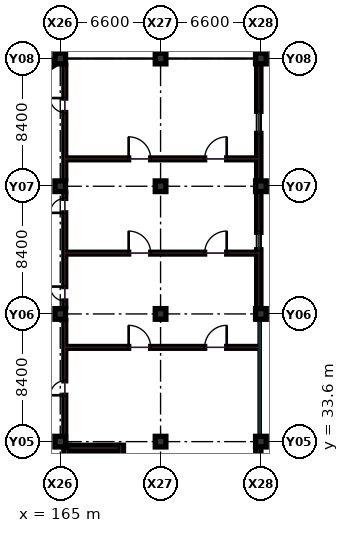
"""IFC4 building model, lengths in metres.
Left out: names, types, materials, properties, quantities, classifications, styles, units other than length and angle.
Written with IfcOpenShell. Run it as: python <this file> out.ifc"""

import sys

from ifc_helpers import new_model, si_unit, direction, frame, frame_2d, origin, origin_2d, place, context, subcontext, project, spatial, rectangle, extrude, element, fill, save


model = new_model("IFC4")
c1 = context("Model", 3, precision=1e-05, world=origin(), true_north=direction((0.0, 1.0)))
c2 = subcontext(c1, "Body", "Model", "MODEL_VIEW")
j1 = project(units=[si_unit("LENGTHUNIT", "METRE"), si_unit("PLANEANGLEUNIT", "RADIAN")], contexts=[c1])
p1 = place(None, origin())
s1 = spatial("IfcSite", under=j1, at=p1, CompositionType="ELEMENT")
p2 = place(p1, origin())
s2 = spatial("IfcBuilding", under=s1, at=p2, CompositionType="ELEMENT")
p3 = place(p2, frame((0.0, 0.0, 14.4)))
s3 = spatial("IfcBuildingStorey", under=s2, at=p3, CompositionType="ELEMENT", Elevation=14.4)
for number, where, z_axis, x_axis in (
    (1, (165.0, 33.6, 0.0), (0.0, 0.0, 1.0), (1.0, 0.0, 0.0)),
    (2, (165.0, 42.0, 0.0), (0.0, 0.0, 1.0), (1.0, 0.0, 0.0)),
    (3, (165.0, 50.4, 0.0), (0.0, 0.0, 1.0), (1.0, 0.0, 0.0)),
    (4, (165.0, 58.8, 0.0), (0.0, 0.0, 1.0), (1.0, 0.0, 0.0)),
    (5, (171.6, 33.6, 0.0), (0.0, 0.0, 1.0), (1.0, 0.0, 0.0)),
    (6, (171.6, 42.0, 0.0), (0.0, 0.0, 1.0), (1.0, 0.0, 0.0)),
    (7, (171.6, 50.4, 0.0), (0.0, 0.0, 1.0), (1.0, 0.0, 0.0)),
    (8, (171.6, 58.8, 0.0), (0.0, 0.0, 1.0), (1.0, 0.0, 0.0)),
    (9, (178.2, 33.6, 0.0), (0.0, 0.0, 1.0), (1.0, 0.0, 0.0)),
    (10, (178.2, 42.0, 0.0), (0.0, 0.0, 1.0), (1.0, 0.0, 0.0)),
    (11, (178.2, 50.4, 0.0), (0.0, 0.0, 1.0), (1.0, 0.0, 0.0)),
    (12, (178.2, 58.8, 0.0), (0.0, 0.0, 1.0), (1.0, 0.0, 0.0)),
):
    element("IfcColumn", number, at=place(p3, frame(where, z_axis=z_axis, x_axis=x_axis)), inside=s3, PredefinedType="COLUMN", context=c2, shape_type="SweptSolid", body=[
        extrude(rectangle(XDim=0.7, YDim=0.7, at=origin_2d()), origin(), (0.0, 0.0, 1.0), 4.2),
    ])
p4 = place(p3, frame((165.3, 33.65, 0.0), z_axis=(0.0, 0.0, 1.0), x_axis=(0.0, 1.0, 0.0)))
e13 = element("IfcWall", 13, at=p4, inside=s3, PredefinedType="PARTITIONING", context=c2, shape_type="SweptSolid", body=[
    extrude(rectangle(XDim=7.9, YDim=0.12, at=frame_2d((3.95, 0.0))), origin(), (0.0, 0.0, 1.0), 3.19),
])
p5 = place(p4, frame((3.0, 0.0, 0.0)))
e14 = element("IfcOpeningElement", 14, at=p5, cuts=e13, PredefinedType="OPENING", context=c2, shape_type="SweptSolid", body=[
    extrude(rectangle(XDim=0.95, YDim=2.15, at=frame_2d((0.475, 1.075))), frame((0.0, 0.07, 0.0), z_axis=(0.0, -1.0, 0.0), x_axis=(1.0, 0.0, 0.0)), (0.0, 0.0, 1.0), 0.14),
])
p6 = place(p3, frame((165.3, 42.45, 0.0), z_axis=(0.0, 0.0, 1.0), x_axis=(0.0, 1.0, 0.0)))
e15 = element("IfcWall", 15, at=p6, inside=s3, PredefinedType="PARTITIONING", context=c2, shape_type="SweptSolid", body=[
    extrude(rectangle(XDim=7.5, YDim=0.12, at=frame_2d((3.75, 0.0))), origin(), (0.0, 0.0, 1.0), 3.19),
])
p7 = place(p6, frame((0.4, 0.0, 0.0)))
e16 = element("IfcOpeningElement", 16, at=p7, cuts=e15, PredefinedType="OPENING", context=c2, shape_type="SweptSolid", body=[
    extrude(rectangle(XDim=0.95, YDim=2.15, at=frame_2d((0.475, 1.075))), frame((0.0, 0.07, 0.0), z_axis=(0.0, -1.0, 0.0), x_axis=(1.0, 0.0, 0.0)), (0.0, 0.0, 1.0), 0.14),
])
p8 = place(p6, frame((6.2, 0.0, 0.0)))
e17 = element("IfcOpeningElement", 17, at=p8, cuts=e15, PredefinedType="OPENING", context=c2, shape_type="SweptSolid", body=[
    extrude(rectangle(XDim=0.95, YDim=2.15, at=frame_2d((0.475, 1.075))), frame((0.0, 0.07, 0.0), z_axis=(0.0, -1.0, 0.0), x_axis=(1.0, 0.0, 0.0)), (0.0, 0.0, 1.0), 0.14),
])
p9 = place(p3, frame((165.3, 50.85, 0.0), z_axis=(0.0, 0.0, 1.0), x_axis=(0.0, 1.0, 0.0)))
e18 = element("IfcWall", 18, at=p9, inside=s3, PredefinedType="PARTITIONING", context=c2, shape_type="SweptSolid", body=[
    extrude(rectangle(XDim=7.53, YDim=0.12, at=frame_2d((3.765, 0.0))), origin(), (0.0, 0.0, 1.0), 3.19),
])
p10 = place(p9, frame((4.4, 0.0, 0.0)))
e19 = element("IfcOpeningElement", 19, at=p10, cuts=e18, PredefinedType="OPENING", context=c2, shape_type="SweptSolid", body=[
    extrude(rectangle(XDim=0.95, YDim=2.15, at=frame_2d((0.475, 1.075))), frame((0.0, 0.07, 0.0), z_axis=(0.0, -1.0, 0.0), x_axis=(1.0, 0.0, 0.0)), (0.0, 0.0, 1.0), 0.14),
])
p11 = place(p3, frame((165.3, 39.8, 0.0), z_axis=(0.0, 0.0, 1.0), x_axis=(1.0, 0.0, 0.0)))
e20 = element("IfcWall", 20, at=p11, inside=s3, PredefinedType="PARTITIONING", context=c2, shape_type="SweptSolid", body=[
    extrude(rectangle(XDim=12.75, YDim=0.12, at=frame_2d((6.375, 0.0))), origin(), (0.0, 0.0, 1.0), 3.19),
])
p12 = place(p11, frame((4.2, 0.0, 0.0)))
e21 = element("IfcOpeningElement", 21, at=p12, cuts=e20, PredefinedType="OPENING", context=c2, shape_type="SweptSolid", body=[
    extrude(rectangle(XDim=1.45, YDim=2.25, at=frame_2d((0.725, 1.125))), frame((0.0, 0.07, 0.0), z_axis=(0.0, -1.0, 0.0), x_axis=(1.0, 0.0, 0.0)), (0.0, 0.0, 1.0), 0.14),
])
p13 = place(p11, frame((9.2, 0.0, 0.0)))
e22 = element("IfcOpeningElement", 22, at=p13, cuts=e20, PredefinedType="OPENING", context=c2, shape_type="SweptSolid", body=[
    extrude(rectangle(XDim=1.45, YDim=2.25, at=frame_2d((0.725, 1.125))), frame((0.0, 0.07, 0.0), z_axis=(0.0, -1.0, 0.0), x_axis=(1.0, 0.0, 0.0)), (0.0, 0.0, 1.0), 0.14),
])
p14 = place(p3, frame((165.3, 46.0, 0.0), z_axis=(0.0, 0.0, 1.0), x_axis=(1.0, 0.0, 0.0)))
e23 = element("IfcWall", 23, at=p14, inside=s3, PredefinedType="PARTITIONING", context=c2, shape_type="SweptSolid", body=[
    extrude(rectangle(XDim=12.75, YDim=0.12, at=frame_2d((6.375, 0.0))), origin(), (0.0, 0.0, 1.0), 3.19),
])
p15 = place(p14, frame((4.2, 0.0, 0.0)))
e24 = element("IfcOpeningElement", 24, at=p15, cuts=e23, PredefinedType="OPENING", context=c2, shape_type="SweptSolid", body=[
    extrude(rectangle(XDim=1.45, YDim=2.25, at=frame_2d((0.725, 1.125))), frame((0.0, 0.07, 0.0), z_axis=(0.0, -1.0, 0.0), x_axis=(1.0, 0.0, 0.0)), (0.0, 0.0, 1.0), 0.14),
])
p16 = place(p14, frame((9.2, 0.0, 0.0)))
e25 = element("IfcOpeningElement", 25, at=p16, cuts=e23, PredefinedType="OPENING", context=c2, shape_type="SweptSolid", body=[
    extrude(rectangle(XDim=1.45, YDim=2.25, at=frame_2d((0.725, 1.125))), frame((0.0, 0.07, 0.0), z_axis=(0.0, -1.0, 0.0), x_axis=(1.0, 0.0, 0.0)), (0.0, 0.0, 1.0), 0.14),
])
p17 = place(p3, frame((165.3, 52.2, 0.0), z_axis=(0.0, 0.0, 1.0), x_axis=(1.0, 0.0, 0.0)))
e26 = element("IfcWall", 26, at=p17, inside=s3, PredefinedType="PARTITIONING", context=c2, shape_type="SweptSolid", body=[
    extrude(rectangle(XDim=12.75, YDim=0.12, at=frame_2d((6.375, 0.0))), origin(), (0.0, 0.0, 1.0), 3.19),
])
p18 = place(p17, frame((4.2, 0.0, 0.0)))
e27 = element("IfcOpeningElement", 27, at=p18, cuts=e26, PredefinedType="OPENING", context=c2, shape_type="SweptSolid", body=[
    extrude(rectangle(XDim=1.45, YDim=2.25, at=frame_2d((0.725, 1.125))), frame((0.0, 0.07, 0.0), z_axis=(0.0, -1.0, 0.0), x_axis=(1.0, 0.0, 0.0)), (0.0, 0.0, 1.0), 0.14),
])
p19 = place(p17, frame((9.2, 0.0, 0.0)))
e28 = element("IfcOpeningElement", 28, at=p19, cuts=e26, PredefinedType="OPENING", context=c2, shape_type="SweptSolid", body=[
    extrude(rectangle(XDim=1.45, YDim=2.25, at=frame_2d((0.725, 1.125))), frame((0.0, 0.07, 0.0), z_axis=(0.0, -1.0, 0.0), x_axis=(1.0, 0.0, 0.0)), (0.0, 0.0, 1.0), 0.14),
])
p20 = place(p3, frame((178.03, 25.545, 0.0), z_axis=(0.0, 0.0, 1.0), x_axis=(0.0, 1.0, 0.0)))
e29 = element("IfcWall", 29, at=p20, inside=s3, PredefinedType="SHEAR", context=c2, shape_type="SweptSolid", body=[
    extrude(rectangle(XDim=7.71, YDim=0.34, at=frame_2d((3.855, 0.0))), origin(), (0.0, 0.0, 1.0), 3.94),
])
p21 = place(p3, frame((178.06, 42.345, 0.0), z_axis=(0.0, 0.0, 1.0), x_axis=(0.0, 1.0, 0.0)))
e30 = element("IfcWall", 30, at=p21, inside=s3, PredefinedType="SOLIDWALL", context=c2, shape_type="SweptSolid", body=[
    extrude(rectangle(XDim=7.71, YDim=0.28, at=frame_2d((3.855, 0.0))), origin(), (0.0, 0.0, 1.0), 3.375),
])
p22 = place(p21, frame((3.875, 0.0, 0.95)))
e31 = element("IfcOpeningElement", 31, at=p22, cuts=e30, PredefinedType="OPENING", context=c2, shape_type="SweptSolid", body=[
    extrude(rectangle(XDim=1.15, YDim=1.6, at=frame_2d((0.575, 0.8))), frame((0.0, 0.15, 0.0), z_axis=(0.0, -1.0, 0.0), x_axis=(1.0, 0.0, 0.0)), (0.0, 0.0, 1.0), 0.3),
])
p23 = place(p3, frame((178.06, 50.745, 0.0), z_axis=(0.0, 0.0, 1.0), x_axis=(0.0, 1.0, 0.0)))
e32 = element("IfcWall", 32, at=p23, inside=s3, PredefinedType="SOLIDWALL", context=c2, shape_type="SweptSolid", body=[
    extrude(rectangle(XDim=7.71, YDim=0.28, at=frame_2d((3.855, 0.0))), origin(), (0.0, 0.0, 1.0), 3.225),
])
p24 = place(p23, frame((3.13, 0.0, 0.95)))
e33 = element("IfcOpeningElement", 33, at=p24, cuts=e32, PredefinedType="OPENING", context=c2, shape_type="SweptSolid", body=[
    extrude(rectangle(XDim=1.45, YDim=1.6, at=frame_2d((0.725, 0.8))), frame((0.0, 0.15, 0.0), z_axis=(0.0, -1.0, 0.0), x_axis=(1.0, 0.0, 0.0)), (0.0, 0.0, 1.0), 0.3),
])
p25 = place(p3, frame((178.06, 59.145, 0.0), z_axis=(0.0, 0.0, 1.0), x_axis=(0.0, 1.0, 0.0)))
e34 = element("IfcWall", 34, at=p25, inside=s3, PredefinedType="SOLIDWALL", context=c2, shape_type="SweptSolid", body=[
    extrude(rectangle(XDim=7.835, YDim=0.28, at=frame_2d((3.917, 0.0))), origin(), (0.0, 0.0, 1.0), 3.375),
])
p26 = place(p25, frame((3.02, 0.0, 0.95)))
e35 = element("IfcOpeningElement", 35, at=p26, cuts=e34, PredefinedType="OPENING", context=c2, shape_type="SweptSolid", body=[
    extrude(rectangle(XDim=1.8, YDim=1.6, at=frame_2d((0.9, 0.8))), frame((0.0, 0.15, 0.0), z_axis=(0.0, -1.0, 0.0), x_axis=(1.0, 0.0, 0.0)), (0.0, 0.0, 1.0), 0.3),
])
p27 = place(p3, frame((158.65, 54.76, 0.0), z_axis=(0.0, 0.0, 1.0), x_axis=(0.843786613851, 0.536678814829, 0.0)))
e36 = element("IfcWall", 36, at=p27, inside=s3, PredefinedType="SHEAR", context=c2, shape_type="SweptSolid", body=[
    extrude(rectangle(XDim=7.229, YDim=0.34, at=frame_2d((3.615, 0.0))), origin(), (0.0, 0.0, 1.0), 3.94),
])
p28 = place(p3, frame((165.42, 25.19, 0.0), z_axis=(0.0, 0.0, 1.0), x_axis=(0.0, 1.0, 0.0)))
e37 = element("IfcWall", 37, at=p28, inside=s3, PredefinedType="SHEAR", context=c2, shape_type="SweptSolid", body=[
    extrude(rectangle(XDim=8.17, YDim=0.36, at=frame_2d((4.085, 0.0))), origin(), (0.0, 0.0, 1.0), 3.94),
])
p29 = place(p3, frame((168.98, 25.19, 0.0), z_axis=(0.0, 0.0, 1.0), x_axis=(0.0, 1.0, 0.0)))
e38 = element("IfcWall", 38, at=p29, inside=s3, PredefinedType="SHEAR", context=c2, shape_type="SweptSolid", body=[
    extrude(rectangle(XDim=8.17, YDim=0.36, at=frame_2d((4.085, 0.0))), origin(), (0.0, 0.0, 1.0), 3.94),
])
p30 = place(p29, frame((0.45, 0.0, 0.0)))
e39 = element("IfcOpeningElement", 39, at=p30, cuts=e38, PredefinedType="OPENING", context=c2, shape_type="SweptSolid", body=[
    extrude(rectangle(XDim=1.25, YDim=2.15, at=frame_2d((0.625, 1.075))), frame((0.0, 0.19, 0.0), z_axis=(0.0, -1.0, 0.0), x_axis=(1.0, 0.0, 0.0)), (0.0, 0.0, 1.0), 0.38),
])
p31 = place(p3, frame((165.6, 33.18, 0.0), z_axis=(0.0, 0.0, 1.0), x_axis=(1.0, 0.0, 0.0)))
e40 = element("IfcWall", 40, at=p31, inside=s3, PredefinedType="SHEAR", context=c2, shape_type="SweptSolid", body=[
    extrude(rectangle(XDim=3.2, YDim=0.36, at=frame_2d((1.6, 0.0))), origin(), (0.0, 0.0, 1.0), 3.94),
])
p32 = place(p5, origin())
e41 = element("IfcDoor", 41, at=p32, inside=s3, OperationType="SINGLE_SWING_LEFT", PredefinedType="DOOR", context=c2, shape_type="SweptSolid", body=[
    extrude(rectangle(XDim=0.95, YDim=2.15, at=frame_2d((0.475, 1.075))), frame((0.0, 0.025, 0.0), z_axis=(0.0, -1.0, 0.0), x_axis=(1.0, 0.0, 0.0)), (0.0, 0.0, 1.0), 0.05),
])
fill(e14, e41)
p33 = place(p7, origin())
e42 = element("IfcDoor", 42, at=p33, inside=s3, OperationType="SINGLE_SWING_RIGHT", PredefinedType="DOOR", context=c2, shape_type="SweptSolid", body=[
    extrude(rectangle(XDim=0.95, YDim=2.15, at=frame_2d((0.475, 1.075))), frame((0.0, 0.025, 0.0), z_axis=(0.0, -1.0, 0.0), x_axis=(1.0, 0.0, 0.0)), (0.0, 0.0, 1.0), 0.05),
])
fill(e16, e42)
p34 = place(p8, origin())
e43 = element("IfcDoor", 43, at=p34, inside=s3, OperationType="SINGLE_SWING_LEFT", PredefinedType="DOOR", context=c2, shape_type="SweptSolid", body=[
    extrude(rectangle(XDim=0.95, YDim=2.15, at=frame_2d((0.475, 1.075))), frame((0.0, 0.025, 0.0), z_axis=(0.0, -1.0, 0.0), x_axis=(1.0, 0.0, 0.0)), (0.0, 0.0, 1.0), 0.05),
])
fill(e17, e43)
p35 = place(p10, origin())
e44 = element("IfcDoor", 44, at=p35, inside=s3, OperationType="SINGLE_SWING_RIGHT", PredefinedType="DOOR", context=c2, shape_type="SweptSolid", body=[
    extrude(rectangle(XDim=0.95, YDim=2.15, at=frame_2d((0.475, 1.075))), frame((0.0, 0.025, 0.0), z_axis=(0.0, -1.0, 0.0), x_axis=(1.0, 0.0, 0.0)), (0.0, 0.0, 1.0), 0.05),
])
fill(e19, e44)
p36 = place(p12, origin())
e45 = element("IfcDoor", 45, at=p36, inside=s3, OperationType="SINGLE_SWING_LEFT", PredefinedType="DOOR", context=c2, shape_type="SweptSolid", body=[
    extrude(rectangle(XDim=1.45, YDim=2.25, at=frame_2d((0.725, 1.125))), frame((0.0, 0.025, 0.0), z_axis=(0.0, -1.0, 0.0), x_axis=(1.0, 0.0, 0.0)), (0.0, 0.0, 1.0), 0.05),
])
fill(e21, e45)
p37 = place(p13, origin())
e46 = element("IfcDoor", 46, at=p37, inside=s3, OperationType="SINGLE_SWING_RIGHT", PredefinedType="DOOR", context=c2, shape_type="SweptSolid", body=[
    extrude(rectangle(XDim=1.45, YDim=2.25, at=frame_2d((0.725, 1.125))), frame((0.0, 0.025, 0.0), z_axis=(0.0, -1.0, 0.0), x_axis=(1.0, 0.0, 0.0)), (0.0, 0.0, 1.0), 0.05),
])
fill(e22, e46)
p38 = place(p15, origin())
e47 = element("IfcDoor", 47, at=p38, inside=s3, OperationType="SINGLE_SWING_LEFT", PredefinedType="DOOR", context=c2, shape_type="SweptSolid", body=[
    extrude(rectangle(XDim=1.45, YDim=2.25, at=frame_2d((0.725, 1.125))), frame((0.0, 0.025, 0.0), z_axis=(0.0, -1.0, 0.0), x_axis=(1.0, 0.0, 0.0)), (0.0, 0.0, 1.0), 0.05),
])
fill(e24, e47)
p39 = place(p16, origin())
e48 = element("IfcDoor", 48, at=p39, inside=s3, OperationType="SINGLE_SWING_RIGHT", PredefinedType="DOOR", context=c2, shape_type="SweptSolid", body=[
    extrude(rectangle(XDim=1.45, YDim=2.25, at=frame_2d((0.725, 1.125))), frame((0.0, 0.025, 0.0), z_axis=(0.0, -1.0, 0.0), x_axis=(1.0, 0.0, 0.0)), (0.0, 0.0, 1.0), 0.05),
])
fill(e25, e48)
p40 = place(p18, origin())
e49 = element("IfcDoor", 49, at=p40, inside=s3, OperationType="SINGLE_SWING_LEFT", PredefinedType="DOOR", context=c2, shape_type="SweptSolid", body=[
    extrude(rectangle(XDim=1.45, YDim=2.25, at=frame_2d((0.725, 1.125))), frame((0.0, 0.025, 0.0), z_axis=(0.0, -1.0, 0.0), x_axis=(1.0, 0.0, 0.0)), (0.0, 0.0, 1.0), 0.05),
])
fill(e27, e49)
p41 = place(p19, origin())
e50 = element("IfcDoor", 50, at=p41, inside=s3, OperationType="SINGLE_SWING_RIGHT", PredefinedType="DOOR", context=c2, shape_type="SweptSolid", body=[
    extrude(rectangle(XDim=1.45, YDim=2.25, at=frame_2d((0.725, 1.125))), frame((0.0, 0.025, 0.0), z_axis=(0.0, -1.0, 0.0), x_axis=(1.0, 0.0, 0.0)), (0.0, 0.0, 1.0), 0.05),
])
fill(e28, e50)
p42 = place(p22, origin())
e51 = element("IfcWindow", 51, at=p42, inside=s3, PartitioningType="SINGLE_PANEL", PredefinedType="WINDOW", context=c2, shape_type="SweptSolid", body=[
    extrude(rectangle(XDim=1.15, YDim=1.6, at=frame_2d((0.575, 0.8))), frame((0.0, 0.03, 0.0), z_axis=(0.0, -1.0, 0.0), x_axis=(1.0, 0.0, 0.0)), (0.0, 0.0, 1.0), 0.06),
])
fill(e31, e51)
p43 = place(p24, origin())
e52 = element("IfcWindow", 52, at=p43, inside=s3, PartitioningType="SINGLE_PANEL", PredefinedType="WINDOW", context=c2, shape_type="SweptSolid", body=[
    extrude(rectangle(XDim=1.45, YDim=1.6, at=frame_2d((0.725, 0.8))), frame((0.0, 0.03, 0.0), z_axis=(0.0, -1.0, 0.0), x_axis=(1.0, 0.0, 0.0)), (0.0, 0.0, 1.0), 0.06),
])
fill(e33, e52)
save(model, sys.argv[1])
